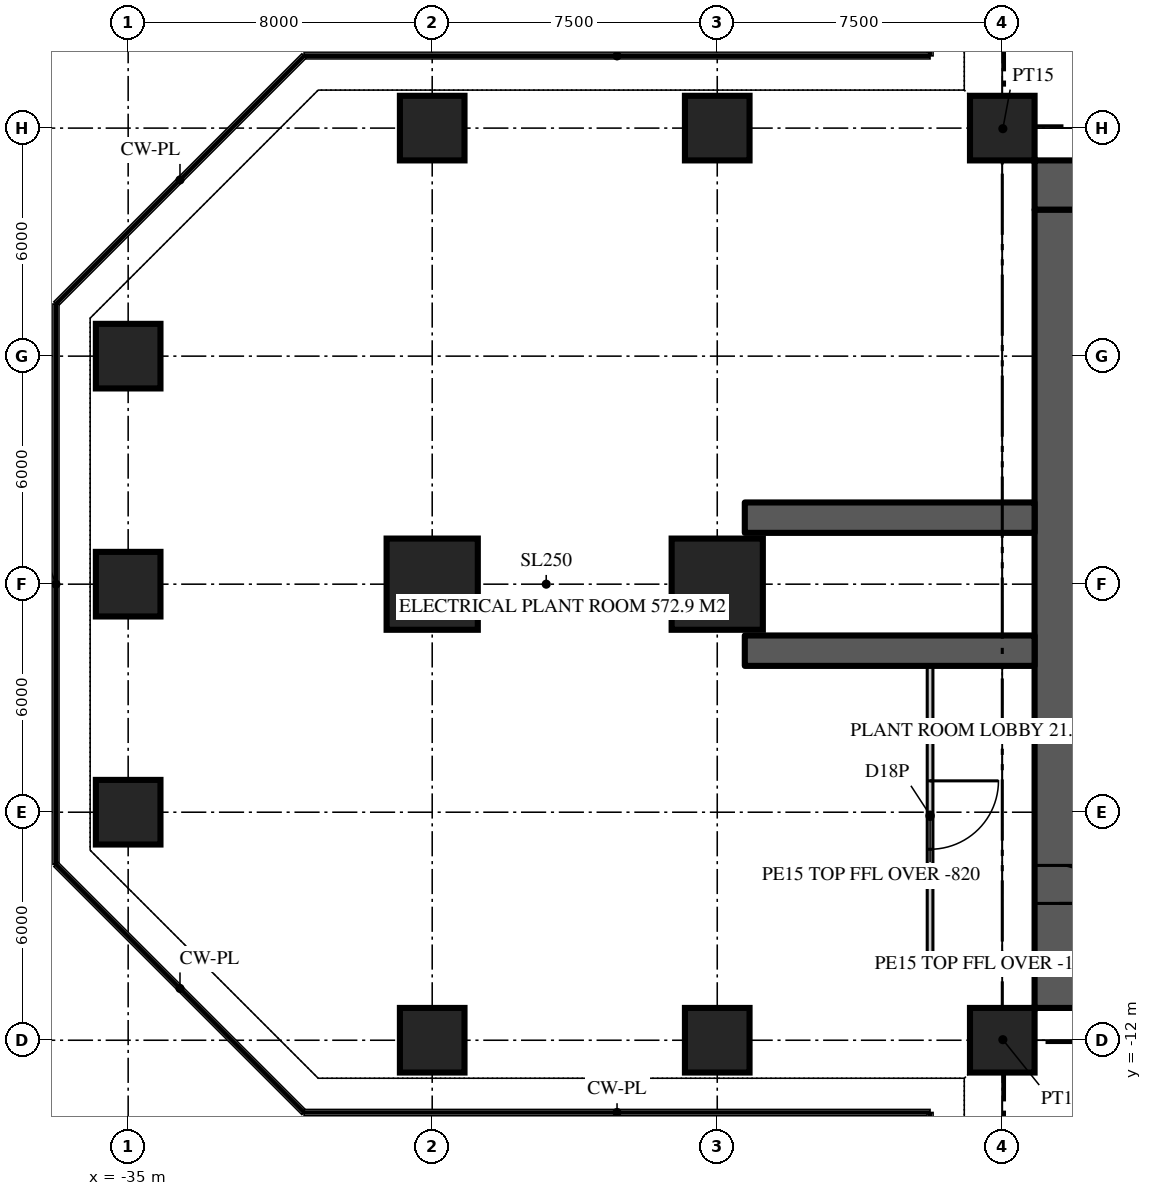
"""IFC4 building model, lengths in metres.
Left out: names, types, materials, properties, quantities, classifications, styles, units other than length and angle.
Written with IfcOpenShell. Run it as: python <this file> out.ifc"""

import sys

from ifc_helpers import new_model, si_unit, direction, frame, frame_2d, origin, origin_2d, place, context, subcontext, project, spatial, rectangle, extrude, element, fill, save


model = new_model("IFC4")
c1 = context("Model", 3, precision=1e-05, world=origin(), true_north=direction((0.0, 1.0)))
c2 = subcontext(c1, "Body", "Model", "MODEL_VIEW")
j1 = project(units=[si_unit("LENGTHUNIT", "METRE"), si_unit("PLANEANGLEUNIT", "RADIAN")], contexts=[c1])
p1 = place(None, origin())
s1 = spatial("IfcSite", under=j1, at=p1, CompositionType="ELEMENT")
p2 = place(p1, origin())
s2 = spatial("IfcBuilding", under=s1, at=p2, CompositionType="ELEMENT")
p3 = place(p2, frame((0.0, 0.0, 37.5)))
s3 = spatial("IfcBuildingStorey", under=s2, at=p3, CompositionType="ELEMENT", Elevation=37.5)
p4 = place(p3, frame((-11.15, 10.5, 0.0), z_axis=(0.0, 0.0, 1.0), x_axis=(1.0, 0.0, 0.0)))
e1 = element("IfcWall", 1, at=p4, inside=s3, PredefinedType="SHEAR", context=c2, shape_type="SweptSolid", body=[
    extrude(rectangle(XDim=22.3, YDim=1.3, at=frame_2d((11.15, 0.0))), origin(), (0.0, 0.0, 1.0), 6.0),
])
p5 = place(p4, frame((4.25, 0.0, 0.0)))
e2 = element("IfcOpeningElement", 2, at=p5, cuts=e1, PredefinedType="OPENING", context=c2, shape_type="SweptSolid", body=[
    extrude(rectangle(XDim=1.8, YDim=2.2, at=frame_2d((0.9, 1.1))), frame((0.0, 0.66, 0.0), z_axis=(0.0, -1.0, 0.0), x_axis=(1.0, 0.0, 0.0)), (0.0, 0.0, 1.0), 1.32),
])
p6 = place(p4, frame((16.25, 0.0, 0.0)))
e3 = element("IfcOpeningElement", 3, at=p6, cuts=e1, PredefinedType="OPENING", context=c2, shape_type="SweptSolid", body=[
    extrude(rectangle(XDim=1.8, YDim=2.2, at=frame_2d((0.9, 1.1))), frame((0.0, 0.66, 0.0), z_axis=(0.0, -1.0, 0.0), x_axis=(1.0, 0.0, 0.0)), (0.0, 0.0, 1.0), 1.32),
])
p7 = place(p3, frame((11.15, -10.5, 0.0), z_axis=(0.0, 0.0, 1.0), x_axis=(-1.0, 0.0, 0.0)))
e4 = element("IfcWall", 4, at=p7, inside=s3, PredefinedType="SHEAR", context=c2, shape_type="SweptSolid", body=[
    extrude(rectangle(XDim=22.3, YDim=1.3, at=frame_2d((11.15, 0.0))), origin(), (0.0, 0.0, 1.0), 6.0),
])
p8 = place(p7, frame((16.25, 0.0, 0.0)))
e5 = element("IfcOpeningElement", 5, at=p8, cuts=e4, PredefinedType="OPENING", context=c2, shape_type="SweptSolid", body=[
    extrude(rectangle(XDim=1.8, YDim=2.2, at=frame_2d((0.9, 1.1))), frame((0.0, 0.66, 0.0), z_axis=(0.0, -1.0, 0.0), x_axis=(1.0, 0.0, 0.0)), (0.0, 0.0, 1.0), 1.32),
])
p9 = place(p7, frame((4.25, 0.0, 0.0)))
e6 = element("IfcOpeningElement", 6, at=p9, cuts=e4, PredefinedType="OPENING", context=c2, shape_type="SweptSolid", body=[
    extrude(rectangle(XDim=1.8, YDim=2.2, at=frame_2d((0.9, 1.1))), frame((0.0, 0.66, 0.0), z_axis=(0.0, -1.0, 0.0), x_axis=(1.0, 0.0, 0.0)), (0.0, 0.0, 1.0), 1.32),
])
p10 = place(p3, frame((-10.5, 9.85, 0.0), z_axis=(0.0, 0.0, 1.0), x_axis=(0.0, -1.0, 0.0)))
e7 = element("IfcWall", 7, at=p10, inside=s3, PredefinedType="SHEAR", context=c2, shape_type="SweptSolid", body=[
    extrude(rectangle(XDim=19.7, YDim=1.3, at=frame_2d((9.85, 0.0))), origin(), (0.0, 0.0, 1.0), 6.0),
])
p11 = place(p10, frame((17.25, 0.0, 0.0)))
e8 = element("IfcOpeningElement", 8, at=p11, cuts=e7, PredefinedType="OPENING", context=c2, shape_type="SweptSolid", body=[
    extrude(rectangle(XDim=1.0, YDim=2.2, at=frame_2d((0.5, 1.1))), frame((0.0, 0.66, 0.0), z_axis=(0.0, -1.0, 0.0), x_axis=(1.0, 0.0, 0.0)), (0.0, 0.0, 1.0), 1.32),
])
for number, where, z_axis, x_axis in (
    (9, (-11.15, 1.75, 0.0), (0.0, 0.0, 1.0), (-1.0, 0.0, 0.0)),
    (10, (-11.15, -1.75, 0.0), (0.0, 0.0, 1.0), (-1.0, 0.0, 0.0)),
):
    element("IfcWall", number, at=place(p3, frame(where, z_axis=z_axis, x_axis=x_axis)), inside=s3, PredefinedType="SHEAR", context=c2, shape_type="SweptSolid", body=[
        extrude(rectangle(XDim=7.625, YDim=0.8, at=frame_2d((3.812, 0.0))), origin(), (0.0, 0.0, 1.0), 6.0),
    ])
for number, where, z_axis, x_axis in (
    (11, (-27.0, -12.0, 0.0), (0.0, 0.0, 1.0), (1.0, 0.0, 0.0)),
    (12, (-19.5, -12.0, 0.0), (0.0, 0.0, 1.0), (1.0, 0.0, 0.0)),
    (13, (-12.0, -12.0, 0.0), (0.0, 0.0, 1.0), (1.0, 0.0, 0.0)),
    (14, (-35.0, -6.0, 0.0), (0.0, 0.0, 1.0), (1.0, 0.0, 0.0)),
    (15, (-35.0, 0.0, 0.0), (0.0, 0.0, 1.0), (1.0, 0.0, 0.0)),
):
    element("IfcColumn", number, at=place(p3, frame(where, z_axis=z_axis, x_axis=x_axis)), inside=s3, PredefinedType="COLUMN", context=c2, shape_type="SweptSolid", body=[
        extrude(rectangle(XDim=1.7, YDim=1.7, at=origin_2d()), origin(), (0.0, 0.0, 1.0), 6.0),
    ])
for number, where, z_axis, x_axis in (
    (16, (-27.0, 0.0, 0.0), (0.0, 0.0, 1.0), (1.0, 0.0, 0.0)),
    (17, (-19.5, 0.0, 0.0), (0.0, 0.0, 1.0), (1.0, 0.0, 0.0)),
):
    element("IfcColumn", number, at=place(p3, frame(where, z_axis=z_axis, x_axis=x_axis)), inside=s3, PredefinedType="COLUMN", context=c2, shape_type="SweptSolid", body=[
        extrude(rectangle(XDim=2.4, YDim=2.4, at=origin_2d()), origin(), (0.0, 0.0, 1.0), 6.0),
    ])
for number, where, z_axis, x_axis in (
    (18, (-35.0, 6.0, 0.0), (0.0, 0.0, 1.0), (1.0, 0.0, 0.0)),
    (19, (-27.0, 12.0, 0.0), (0.0, 0.0, 1.0), (1.0, 0.0, 0.0)),
    (20, (-19.5, 12.0, 0.0), (0.0, 0.0, 1.0), (1.0, 0.0, 0.0)),
    (21, (-12.0, 12.0, 0.0), (0.0, 0.0, 1.0), (1.0, 0.0, 0.0)),
):
    element("IfcColumn", number, at=place(p3, frame(where, z_axis=z_axis, x_axis=x_axis)), inside=s3, PredefinedType="COLUMN", context=c2, shape_type="SweptSolid", body=[
        extrude(rectangle(XDim=1.7, YDim=1.7, at=origin_2d()), origin(), (0.0, 0.0, 1.0), 6.0),
    ])
p12 = place(p3, frame((-13.9, -2.15, 0.0), z_axis=(0.0, 0.0, 1.0), x_axis=(0.0, -1.0, 0.0)))
e22 = element("IfcWall", 22, at=p12, inside=s3, PredefinedType="SOLIDWALL", context=c2, shape_type="SweptSolid", body=[
    extrude(rectangle(XDim=7.925, YDim=0.15, at=frame_2d((3.962, 0.0))), origin(), (0.0, 0.0, 1.0), 5.18),
])
p13 = place(p12, frame((3.025, 0.0, 0.0)))
e23 = element("IfcOpeningElement", 23, at=p13, cuts=e22, PredefinedType="OPENING", context=c2, shape_type="SweptSolid", body=[
    extrude(rectangle(XDim=1.8, YDim=2.4, at=frame_2d((0.9, 1.2))), frame((0.0, 0.085, 0.0), z_axis=(0.0, -1.0, 0.0), x_axis=(1.0, 0.0, 0.0)), (0.0, 0.0, 1.0), 0.17),
])
p14 = place(p3, frame((-11.15, -10.0, 0.0), z_axis=(0.0, 0.0, 1.0), x_axis=(-1.0, 0.0, 0.0)))
e24 = element("IfcWall", 24, at=p14, inside=s3, PredefinedType="SOLIDWALL", context=c2, shape_type="SweptSolid", body=[
    extrude(rectangle(XDim=2.675, YDim=0.15, at=frame_2d((1.337, 0.0))), origin(), (0.0, 0.0, 1.0), 5.87),
])
for number, where, z_axis, x_axis in (
    (25, (-11.15, 11.15, 0.0), (0.0, 0.0, 1.0), (-0.707, 0.707, 0.0)),
    (26, (-11.15, -11.15, 0.0), (0.0, 0.0, 1.0), (-0.707, -0.707, 0.0)),
):
    element("IfcWall", number, at=place(p3, frame(where, z_axis=z_axis, x_axis=x_axis)), inside=s3, PredefinedType="PARTITIONING", context=c2, shape_type="SweptSolid", body=[
        extrude(rectangle(XDim=2.362, YDim=0.15, at=frame_2d((1.181, 0.0))), origin(), (0.0, 0.0, 1.0), 5.32),
    ])
p15 = place(p11, origin())
e27 = element("IfcDoor", 27, at=p15, inside=s3, OperationType="SINGLE_SWING_RIGHT", PredefinedType="DOOR", context=c2, shape_type="SweptSolid", body=[
    extrude(rectangle(XDim=1.0, YDim=2.2, at=frame_2d((0.5, 1.1))), frame((0.0, 0.025, 0.0), z_axis=(0.0, -1.0, 0.0), x_axis=(1.0, 0.0, 0.0)), (0.0, 0.0, 1.0), 0.05),
])
fill(e8, e27)
p16 = place(p13, origin())
e28 = element("IfcDoor", 28, at=p16, inside=s3, OperationType="DOUBLE_DOOR_DOUBLE_SWING", PredefinedType="DOOR", context=c2, shape_type="SweptSolid", body=[
    extrude(rectangle(XDim=1.8, YDim=2.4, at=frame_2d((0.9, 1.2))), frame((0.0, 0.025, 0.0), z_axis=(0.0, -1.0, 0.0), x_axis=(1.0, 0.0, 0.0)), (0.0, 0.0, 1.0), 0.05),
])
fill(e23, e28)
save(model, sys.argv[1])
